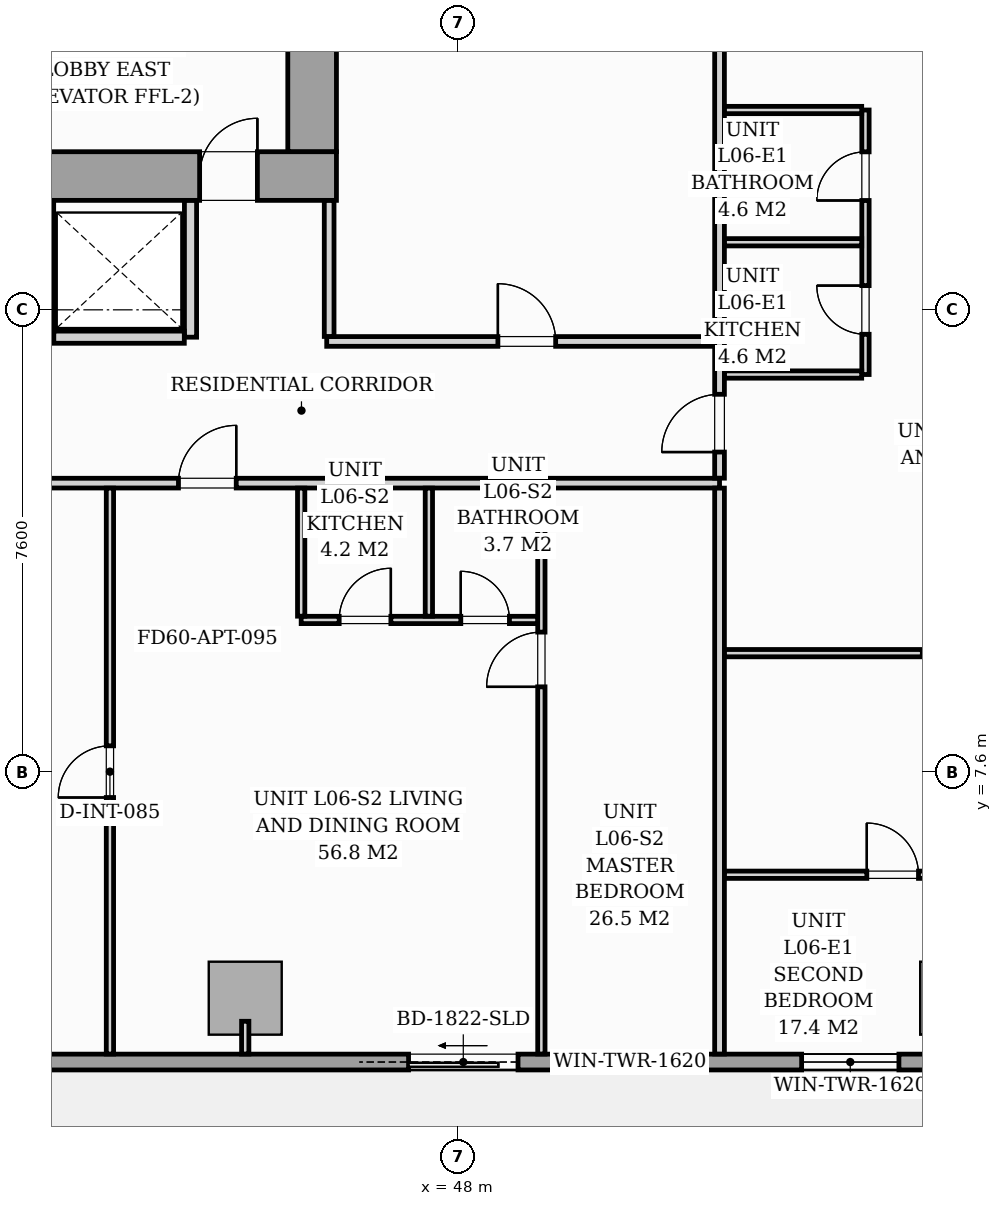
"""IFC4 building model, lengths in metres.
Left out: names, types, materials, properties, quantities, classifications, styles, units other than length and angle.
Written with IfcOpenShell. Run it as: python <this file> out.ifc"""

import sys

from ifc_helpers import new_model, si_unit, direction, frame, frame_2d, origin, origin_2d, place, context, subcontext, project, spatial, rectangle, i_section, extrude, source, transform, mapped, element, fill, save


model = new_model("IFC4")
c1 = context("Model", 3, precision=1e-05, world=origin(), true_north=direction((0.0, 1.0)))
c2 = subcontext(c1, "Body", "Model", "MODEL_VIEW")
j1 = project(units=[si_unit("LENGTHUNIT", "METRE"), si_unit("PLANEANGLEUNIT", "RADIAN")], contexts=[c1])
p1 = place(None, origin())
s1 = spatial("IfcSite", under=j1, at=p1, CompositionType="ELEMENT")
p2 = place(p1, origin())
s2 = spatial("IfcBuilding", under=s1, at=p2, CompositionType="ELEMENT")
p3 = place(p2, frame((0.0, 0.0, 26.2)))
s3 = spatial("IfcBuildingStorey", under=s2, at=p3, CompositionType="ELEMENT", Elevation=26.2)
m1 = source(origin(), c2, "Body", "SweptSolid", [
    extrude(i_section(OverallWidth=0.437, OverallDepth=0.514, WebThickness=0.061, FlangeThickness=0.097, FilletRadius=0.018, at=origin_2d()), origin(), (0.0, 0.0, 1.0), 3.196),
])
p4 = place(p3, frame((45.6, 17.4, 0.002), z_axis=(0.0, 0.0, 1.0), x_axis=(1.0, 0.0, 0.0)))
e1 = element("IfcColumn", 1, at=p4, inside=s3, PredefinedType="PILASTER", context=c2, shape_type="MappedRepresentation", body=[
    mapped(m1, transform((0.0, 0.0, 0.0), scale=1.0)),
])
m2 = source(origin(), c2, "Body", "SweptSolid", [
    extrude(rectangle(XDim=1.2, YDim=1.2, at=origin_2d()), origin(), (0.0, 0.0, 1.0), 3.196),
])
for number, where, z_axis, x_axis in (
    (2, (44.5, 3.88, 0.002), (0.0, 0.0, 1.0), (1.0, 0.0, 0.0)),
    (3, (56.2, 3.88, 0.002), (0.0, 0.0, 1.0), (1.0, 0.0, 0.0)),
):
    element("IfcColumn", number, at=place(p3, frame(where, z_axis=z_axis, x_axis=x_axis)), inside=s3, PredefinedType="COLUMN", context=c2, shape_type="MappedRepresentation", body=[
        mapped(m2, transform((0.0, 0.0, 0.0), scale=1.0)),
    ])
p5 = place(p3, frame((57.3, 2.83, 0.0), z_axis=(0.0, 0.0, 1.0), x_axis=(-1.0, 0.0, 0.0)))
e4 = element("IfcWall", 4, at=p5, inside=s3, PredefinedType="STANDARD", context=c2, shape_type="SweptSolid", body=[
    extrude(rectangle(XDim=17.15, YDim=0.26, at=frame_2d((8.575, 0.0))), origin(), (0.0, 0.0, 1.0), 2.94),
])
p6 = place(p5, frame((8.314, 0.0, 0.0)))
e5 = element("IfcOpeningElement", 5, at=p6, cuts=e4, PredefinedType="OPENING", context=c2, shape_type="SweptSolid", body=[
    extrude(rectangle(XDim=1.8, YDim=2.06, at=frame_2d((0.9, 1.03))), frame((0.0, 0.14, 0.0), z_axis=(0.0, -1.0, 0.0), x_axis=(1.0, 0.0, 0.0)), (0.0, 0.0, 1.0), 0.28),
])
p7 = place(p5, frame((2.05, 0.0, 0.65)))
e6 = element("IfcOpeningElement", 6, at=p7, cuts=e4, PredefinedType="OPENING", context=c2, shape_type="SweptSolid", body=[
    extrude(rectangle(XDim=1.6, YDim=1.5, at=frame_2d((0.8, 0.75))), frame((0.0, 0.14, 0.0), z_axis=(0.0, -1.0, 0.0), x_axis=(1.0, 0.0, 0.0)), (0.0, 0.0, 1.0), 0.28),
])
p8 = place(p5, frame((5.675, 0.0, 0.75)))
e7 = element("IfcOpeningElement", 7, at=p8, cuts=e4, PredefinedType="OPENING", context=c2, shape_type="SweptSolid", body=[
    extrude(rectangle(XDim=1.6, YDim=1.5, at=frame_2d((0.8, 0.75))), frame((0.0, 0.14, 0.0), z_axis=(0.0, -1.0, 0.0), x_axis=(1.0, 0.0, 0.0)), (0.0, 0.0, 1.0), 0.28),
])
p9 = place(p3, frame((26.0, 17.4, 0.0), z_axis=(0.0, 0.0, 1.0), x_axis=(1.0, 0.0, 0.0)))
e8 = element("IfcWall", 8, at=p9, inside=s3, PredefinedType="SHEAR", context=c2, shape_type="SweptSolid", body=[
    extrude(rectangle(XDim=20.0, YDim=0.8, at=frame_2d((10.0, 0.0))), origin(), (0.0, 0.0, 1.0), 3.2),
])
p10 = place(p9, frame((1.15, 0.0, 0.0)))
e9 = element("IfcOpeningElement", 9, at=p10, cuts=e8, PredefinedType="OPENING", context=c2, shape_type="SweptSolid", body=[
    extrude(rectangle(XDim=0.95, YDim=2.06, at=frame_2d((0.475, 1.03))), frame((0.0, 0.41, 0.0), z_axis=(0.0, -1.0, 0.0), x_axis=(1.0, 0.0, 0.0)), (0.0, 0.0, 1.0), 0.82),
])
p11 = place(p9, frame((9.58, 0.0, 0.0)))
e10 = element("IfcOpeningElement", 10, at=p11, cuts=e8, PredefinedType="OPENING", context=c2, shape_type="SweptSolid", body=[
    extrude(rectangle(XDim=0.85, YDim=2.0, at=frame_2d((0.425, 1.0))), frame((0.0, 0.41, 0.0), z_axis=(0.0, -1.0, 0.0), x_axis=(1.0, 0.0, 0.0)), (0.0, 0.0, 1.0), 0.82),
])
p12 = place(p9, frame((17.75, 0.0, 0.0)))
e11 = element("IfcOpeningElement", 11, at=p12, cuts=e8, PredefinedType="OPENING", context=c2, shape_type="SweptSolid", body=[
    extrude(rectangle(XDim=0.95, YDim=2.06, at=frame_2d((0.475, 1.03))), frame((0.0, 0.41, 0.0), z_axis=(0.0, -1.0, 0.0), x_axis=(1.0, 0.0, 0.0)), (0.0, 0.0, 1.0), 0.82),
])
p13 = place(p3, frame((45.6, 17.802, 0.0), z_axis=(0.0, 0.0, 1.0), x_axis=(0.0, 1.0, 0.0)))
e12 = element("IfcWall", 12, at=p13, inside=s3, PredefinedType="SHEAR", context=c2, shape_type="SweptSolid", body=[
    extrude(rectangle(XDim=5.796, YDim=0.8, at=frame_2d((2.898, 0.0))), origin(), (0.0, 0.0, 1.0), 3.2),
])
for number, where, z_axis, x_axis in (
    (13, (41.25, 14.75, 0.0), (0.0, 0.0, 1.0), (0.0, 1.0, 0.0)),
    (14, (43.6, 14.75, 0.0), (0.0, 0.0, 1.0), (0.0, 1.0, 0.0)),
):
    element("IfcWall", number, at=place(p3, frame(where, z_axis=z_axis, x_axis=x_axis)), inside=s3, PredefinedType="PARTITIONING", context=c2, shape_type="SweptSolid", body=[
        extrude(rectangle(XDim=2.248, YDim=0.2, at=frame_2d((1.124, 0.0))), origin(), (0.0, 0.0, 1.0), 2.94),
    ])
p14 = place(p3, frame((41.352, 14.75, 0.0), z_axis=(0.0, 0.0, 1.0), x_axis=(1.0, 0.0, 0.0)))
e15 = element("IfcWall", 15, at=p14, inside=s3, PredefinedType="PARTITIONING", context=c2, shape_type="SweptSolid", body=[
    extrude(rectangle(XDim=2.146, YDim=0.2, at=frame_2d((1.073, 0.0))), origin(), (0.0, 0.0, 1.0), 2.94),
])
p15 = place(p3, frame((15.2, 12.35, 0.0), z_axis=(0.0, 0.0, 1.0), x_axis=(1.0, 0.0, 0.0)))
e16 = element("IfcWall", 16, at=p15, inside=s3, PredefinedType="PARTITIONING", context=c2, shape_type="SweptSolid", body=[
    extrude(rectangle(XDim=37.1, YDim=0.16, at=frame_2d((18.55, 0.0))), origin(), (0.0, 0.0, 1.0), 2.94),
])
p16 = place(p15, frame((2.964, 0.0, 0.0)))
e17 = element("IfcOpeningElement", 17, at=p16, cuts=e16, PredefinedType="OPENING", context=c2, shape_type="SweptSolid", body=[
    extrude(rectangle(XDim=0.95, YDim=2.06, at=frame_2d((0.475, 1.03))), frame((0.0, 0.09, 0.0), z_axis=(0.0, -1.0, 0.0), x_axis=(1.0, 0.0, 0.0)), (0.0, 0.0, 1.0), 0.18),
])
p17 = place(p15, frame((28.202, 0.0, 0.0)))
e18 = element("IfcOpeningElement", 18, at=p17, cuts=e16, PredefinedType="OPENING", context=c2, shape_type="SweptSolid", body=[
    extrude(rectangle(XDim=0.95, YDim=2.06, at=frame_2d((0.475, 1.03))), frame((0.0, 0.09, 0.0), z_axis=(0.0, -1.0, 0.0), x_axis=(1.0, 0.0, 0.0)), (0.0, 0.0, 1.0), 0.18),
])
p18 = place(p3, frame((52.3, 2.962, 0.0), z_axis=(0.0, 0.0, 1.0), x_axis=(0.0, 1.0, 0.0)))
e19 = element("IfcWall", 19, at=p18, inside=s3, PredefinedType="PARTITIONING", context=c2, shape_type="SweptSolid", body=[
    extrude(rectangle(XDim=9.306, YDim=0.16, at=frame_2d((4.653, 0.0))), origin(), (0.0, 0.0, 1.0), 2.94),
])
p19 = place(p3, frame((52.3, 12.432, 0.0), z_axis=(0.0, 0.0, 1.0), x_axis=(0.0, 1.0, 0.0)))
e20 = element("IfcWall", 20, at=p19, inside=s3, PredefinedType="PARTITIONING", context=c2, shape_type="SweptSolid", body=[
    extrude(rectangle(XDim=15.006, YDim=0.16, at=frame_2d((7.503, 0.0))), origin(), (0.0, 0.0, 1.0), 2.94),
])
p20 = place(p19, frame((0.429, 0.0, 0.0)))
e21 = element("IfcOpeningElement", 21, at=p20, cuts=e20, PredefinedType="OPENING", context=c2, shape_type="SweptSolid", body=[
    extrude(rectangle(XDim=0.95, YDim=2.06, at=frame_2d((0.475, 1.03))), frame((0.0, 0.09, 0.0), z_axis=(0.0, -1.0, 0.0), x_axis=(1.0, 0.0, 0.0)), (0.0, 0.0, 1.0), 0.18),
])
p21 = place(p3, frame((49.37, 2.962, 0.0), z_axis=(0.0, 0.0, 1.0), x_axis=(0.0, 1.0, 0.0)))
e22 = element("IfcWall", 22, at=p21, inside=s3, PredefinedType="PARTITIONING", context=c2, shape_type="SweptSolid", body=[
    extrude(rectangle(XDim=9.306, YDim=0.12, at=frame_2d((4.653, 0.0))), origin(), (0.0, 0.0, 1.0), 2.94),
])
p22 = place(p21, frame((6.038, 0.0, 0.0)))
e23 = element("IfcOpeningElement", 23, at=p22, cuts=e22, PredefinedType="OPENING", context=c2, shape_type="SweptSolid", body=[
    extrude(rectangle(XDim=0.9, YDim=2.05, at=frame_2d((0.45, 1.025))), frame((0.0, 0.07, 0.0), z_axis=(0.0, -1.0, 0.0), x_axis=(1.0, 0.0, 0.0)), (0.0, 0.0, 1.0), 0.14),
])
p23 = place(p3, frame((45.42, 10.1, 0.0), z_axis=(0.0, 0.0, 1.0), x_axis=(1.0, 0.0, 0.0)))
e24 = element("IfcWall", 24, at=p23, inside=s3, PredefinedType="PARTITIONING", context=c2, shape_type="SweptSolid", body=[
    extrude(rectangle(XDim=3.888, YDim=0.12, at=frame_2d((1.944, 0.0))), origin(), (0.0, 0.0, 1.0), 2.94),
])
p24 = place(p23, frame((0.625, 0.0, 0.0)))
e25 = element("IfcOpeningElement", 25, at=p24, cuts=e24, PredefinedType="OPENING", context=c2, shape_type="SweptSolid", body=[
    extrude(rectangle(XDim=0.85, YDim=2.05, at=frame_2d((0.425, 1.025))), frame((0.0, 0.07, 0.0), z_axis=(0.0, -1.0, 0.0), x_axis=(1.0, 0.0, 0.0)), (0.0, 0.0, 1.0), 0.14),
])
p25 = place(p23, frame((2.625, 0.0, 0.0)))
e26 = element("IfcOpeningElement", 26, at=p25, cuts=e24, PredefinedType="OPENING", context=c2, shape_type="SweptSolid", body=[
    extrude(rectangle(XDim=0.8, YDim=2.02, at=frame_2d((0.4, 1.01))), frame((0.0, 0.07, 0.0), z_axis=(0.0, -1.0, 0.0), x_axis=(1.0, 0.0, 0.0)), (0.0, 0.0, 1.0), 0.14),
])
for number, where, z_axis, x_axis in (
    (27, (47.52, 10.162, 0.0), (0.0, 0.0, 1.0), (0.0, 1.0, 0.0)),
    (28, (45.42, 10.162, 0.0), (0.0, 0.0, 1.0), (0.0, 1.0, 0.0)),
):
    element("IfcWall", number, at=place(p3, frame(where, z_axis=z_axis, x_axis=x_axis)), inside=s3, PredefinedType="PARTITIONING", context=c2, shape_type="SweptSolid", body=[
        extrude(rectangle(XDim=2.106, YDim=0.12, at=frame_2d((1.053, 0.0))), origin(), (0.0, 0.0, 1.0), 2.94),
    ])
p26 = place(p3, frame((42.275, 2.962, 0.0), z_axis=(0.0, 0.0, 1.0), x_axis=(0.0, 1.0, 0.0)))
e29 = element("IfcWall", 29, at=p26, inside=s3, PredefinedType="PARTITIONING", context=c2, shape_type="SweptSolid", body=[
    extrude(rectangle(XDim=9.306, YDim=0.12, at=frame_2d((4.653, 0.0))), origin(), (0.0, 0.0, 1.0), 2.94),
])
p27 = place(p26, frame((4.218, 0.0, 0.0)))
e30 = element("IfcOpeningElement", 30, at=p27, cuts=e29, PredefinedType="OPENING", context=c2, shape_type="SweptSolid", body=[
    extrude(rectangle(XDim=0.85, YDim=2.05, at=frame_2d((0.425, 1.025))), frame((0.0, 0.07, 0.0), z_axis=(0.0, -1.0, 0.0), x_axis=(1.0, 0.0, 0.0)), (0.0, 0.0, 1.0), 0.14),
])
p28 = place(p3, frame((54.7, 14.136, 0.0), z_axis=(0.0, 0.0, 1.0), x_axis=(0.0, 1.0, 0.0)))
e31 = element("IfcWall", 31, at=p28, inside=s3, PredefinedType="PARTITIONING", context=c2, shape_type="SweptSolid", body=[
    extrude(rectangle(XDim=4.35, YDim=0.12, at=frame_2d((2.175, 0.0))), origin(), (0.0, 0.0, 1.0), 2.94),
])
p29 = place(p28, frame((0.662, 0.0, 0.0)))
e32 = element("IfcOpeningElement", 32, at=p29, cuts=e31, PredefinedType="OPENING", context=c2, shape_type="SweptSolid", body=[
    extrude(rectangle(XDim=0.8, YDim=2.0, at=frame_2d((0.4, 1.0))), frame((0.0, 0.07, 0.0), z_axis=(0.0, -1.0, 0.0), x_axis=(1.0, 0.0, 0.0)), (0.0, 0.0, 1.0), 0.14),
])
p30 = place(p28, frame((2.862, 0.0, 0.0)))
e33 = element("IfcOpeningElement", 33, at=p30, cuts=e31, PredefinedType="OPENING", context=c2, shape_type="SweptSolid", body=[
    extrude(rectangle(XDim=0.8, YDim=2.02, at=frame_2d((0.4, 1.01))), frame((0.0, 0.07, 0.0), z_axis=(0.0, -1.0, 0.0), x_axis=(1.0, 0.0, 0.0)), (0.0, 0.0, 1.0), 0.14),
])
p31 = place(p3, frame((52.382, 16.311, 0.0), z_axis=(0.0, 0.0, 1.0), x_axis=(1.0, 0.0, 0.0)))
e34 = element("IfcWall", 34, at=p31, inside=s3, PredefinedType="PARTITIONING", context=c2, shape_type="SweptSolid", body=[
    extrude(rectangle(XDim=2.256, YDim=0.12, at=frame_2d((1.128, 0.0))), origin(), (0.0, 0.0, 1.0), 2.045),
])
for number, where, z_axis, x_axis in (
    (35, (52.382, 14.136, 0.0), (0.0, 0.0, 1.0), (1.0, 0.0, 0.0)),
    (36, (52.382, 18.486, 0.0), (0.0, 0.0, 1.0), (1.0, 0.0, 0.0)),
):
    element("IfcWall", number, at=place(p3, frame(where, z_axis=z_axis, x_axis=x_axis)), inside=s3, PredefinedType="PARTITIONING", context=c2, shape_type="SweptSolid", body=[
        extrude(rectangle(XDim=2.256, YDim=0.12, at=frame_2d((1.128, 0.0))), origin(), (0.0, 0.0, 1.0), 2.94),
    ])
p32 = place(p3, frame((52.382, 5.91, 0.0), z_axis=(0.0, 0.0, 1.0), x_axis=(1.0, 0.0, 0.0)))
e37 = element("IfcWall", 37, at=p32, inside=s3, PredefinedType="PARTITIONING", context=c2, shape_type="SweptSolid", body=[
    extrude(rectangle(XDim=7.338, YDim=0.12, at=frame_2d((3.669, 0.0))), origin(), (0.0, 0.0, 1.0), 2.94),
])
p33 = place(p32, frame((2.34, 0.0, 0.0)))
e38 = element("IfcOpeningElement", 38, at=p33, cuts=e37, PredefinedType="OPENING", context=c2, shape_type="SweptSolid", body=[
    extrude(rectangle(XDim=0.85, YDim=2.05, at=frame_2d((0.425, 1.025))), frame((0.0, 0.07, 0.0), z_axis=(0.0, -1.0, 0.0), x_axis=(1.0, 0.0, 0.0)), (0.0, 0.0, 1.0), 0.14),
])
p34 = place(p3, frame((52.382, 9.554, 0.0), z_axis=(0.0, 0.0, 1.0), x_axis=(1.0, 0.0, 0.0)))
e39 = element("IfcWall", 39, at=p34, inside=s3, PredefinedType="PARTITIONING", context=c2, shape_type="SweptSolid", body=[
    extrude(rectangle(XDim=7.338, YDim=0.12, at=frame_2d((3.669, 0.0))), origin(), (0.0, 0.0, 1.0), 2.94),
])
p35 = place(p34, frame((3.253, 0.0, 0.0)))
e40 = element("IfcOpeningElement", 40, at=p35, cuts=e39, PredefinedType="OPENING", context=c2, shape_type="SweptSolid", body=[
    extrude(rectangle(XDim=0.85, YDim=2.05, at=frame_2d((0.425, 1.025))), frame((0.0, 0.07, 0.0), z_axis=(0.0, -1.0, 0.0), x_axis=(1.0, 0.0, 0.0)), (0.0, 0.0, 1.0), 0.14),
])
p36 = place(p3, frame((45.84, 14.68, 0.0), z_axis=(0.0, 0.0, 1.0), x_axis=(1.0, 0.0, 0.0)))
e41 = element("IfcWall", 41, at=p36, inside=s3, PredefinedType="PARTITIONING", context=c2, shape_type="SweptSolid", body=[
    extrude(rectangle(XDim=6.378, YDim=0.16, at=frame_2d((3.189, 0.0))), origin(), (0.0, 0.0, 1.0), 2.94),
])
p37 = place(p36, frame((2.815, 0.0, 0.0)))
e42 = element("IfcOpeningElement", 42, at=p37, cuts=e41, PredefinedType="OPENING", context=c2, shape_type="SweptSolid", body=[
    extrude(rectangle(XDim=0.95, YDim=2.06, at=frame_2d((0.475, 1.03))), frame((0.0, 0.09, 0.0), z_axis=(0.0, -1.0, 0.0), x_axis=(1.0, 0.0, 0.0)), (0.0, 0.0, 1.0), 0.18),
])
p38 = place(p3, frame((45.88, 14.762, 0.0), z_axis=(0.0, 0.0, 1.0), x_axis=(0.0, 1.0, 0.0)))
e43 = element("IfcWall", 43, at=p38, inside=s3, PredefinedType="PARTITIONING", context=c2, shape_type="SweptSolid", body=[
    extrude(rectangle(XDim=2.236, YDim=0.16, at=frame_2d((1.118, 0.0))), origin(), (0.0, 0.0, 1.0), 2.94),
])
p39 = place(p3, frame((44.5, 3.5, 0.0), z_axis=(0.0, 0.0, 1.0), x_axis=(0.0, -1.0, 0.0)))
e44 = element("IfcWall", 44, at=p39, inside=s3, PredefinedType="PARTITIONING", context=c2, shape_type="SweptSolid", body=[
    extrude(rectangle(XDim=0.538, YDim=0.12, at=frame_2d((0.269, 0.0))), origin(), (0.0, 0.0, 1.0), 2.94),
])
m3 = source(origin(), c2, "Body", "SweptSolid", [
    extrude(rectangle(XDim=1.8, YDim=2.06, at=frame_2d((0.9, 1.03))), frame((0.0, 0.025, 0.0), z_axis=(0.0, -1.0, 0.0), x_axis=(1.0, 0.0, 0.0)), (0.0, 0.0, 1.0), 0.05),
])
p40 = place(p6, origin())
e45 = element("IfcDoor", 45, at=p40, inside=s3, OperationType="SLIDING_TO_RIGHT", PredefinedType="DOOR", context=c2, shape_type="MappedRepresentation", body=[
    mapped(m3, transform((0.0, 0.0, 0.0), scale=1.0)),
])
fill(e5, e45)
m4 = source(origin(), c2, "Body", "SweptSolid", [
    extrude(rectangle(XDim=1.6, YDim=1.5, at=frame_2d((0.8, 0.75))), frame((0.0, 0.03, 0.0), z_axis=(0.0, -1.0, 0.0), x_axis=(1.0, 0.0, 0.0)), (0.0, 0.0, 1.0), 0.06),
])
p41 = place(p7, origin())
e46 = element("IfcWindow", 46, at=p41, inside=s3, PartitioningType="SINGLE_PANEL", PredefinedType="WINDOW", context=c2, shape_type="MappedRepresentation", body=[
    mapped(m4, transform((0.0, 0.0, 0.0), scale=1.0)),
])
fill(e6, e46)
p42 = place(p8, origin())
e47 = element("IfcWindow", 47, at=p42, inside=s3, PartitioningType="SINGLE_PANEL", PredefinedType="WINDOW", context=c2, shape_type="MappedRepresentation", body=[
    mapped(m4, transform((0.0, 0.0, 0.0), scale=1.0)),
])
fill(e7, e47)
m5 = source(origin(), c2, "Body", "SweptSolid", [
    extrude(rectangle(XDim=0.95, YDim=2.06, at=frame_2d((0.475, 1.03))), frame((0.0, 0.025, 0.0), z_axis=(0.0, -1.0, 0.0), x_axis=(1.0, 0.0, 0.0)), (0.0, 0.0, 1.0), 0.05),
])
p43 = place(p12, origin())
e48 = element("IfcDoor", 48, at=p43, inside=s3, OperationType="SINGLE_SWING_RIGHT", PredefinedType="DOOR", context=c2, shape_type="MappedRepresentation", body=[
    mapped(m5, transform((0.0, 0.0, 0.0), scale=1.0)),
])
fill(e11, e48)
m6 = source(origin(), c2, "Body", "SweptSolid", [
    extrude(rectangle(XDim=0.85, YDim=2.05, at=frame_2d((0.425, 1.025))), frame((0.0, 0.025, 0.0), z_axis=(0.0, -1.0, 0.0), x_axis=(1.0, 0.0, 0.0)), (0.0, 0.0, 1.0), 0.05),
])
p44 = place(p27, origin())
e49 = element("IfcDoor", 49, at=p44, inside=s3, OperationType="SINGLE_SWING_LEFT", PredefinedType="DOOR", context=c2, shape_type="MappedRepresentation", body=[
    mapped(m6, transform((0.0, 0.0, 0.0), scale=1.0)),
])
fill(e30, e49)
m7 = source(origin(), c2, "Body", "SweptSolid", [
    extrude(rectangle(XDim=0.95, YDim=2.06, at=frame_2d((0.475, 1.03))), frame((0.0, 0.025, 0.0), z_axis=(0.0, -1.0, 0.0), x_axis=(1.0, 0.0, 0.0)), (0.0, 0.0, 1.0), 0.05),
])
p45 = place(p17, origin())
e50 = element("IfcDoor", 50, at=p45, inside=s3, OperationType="SINGLE_SWING_RIGHT", PredefinedType="DOOR", context=c2, shape_type="MappedRepresentation", body=[
    mapped(m7, transform((0.0, 0.0, 0.0), scale=1.0)),
])
fill(e18, e50)
m8 = source(origin(), c2, "Body", "SweptSolid", [
    extrude(rectangle(XDim=0.9, YDim=2.05, at=frame_2d((0.45, 1.025))), frame((0.0, 0.025, 0.0), z_axis=(0.0, -1.0, 0.0), x_axis=(1.0, 0.0, 0.0)), (0.0, 0.0, 1.0), 0.05),
])
p46 = place(p22, origin())
e51 = element("IfcDoor", 51, at=p46, inside=s3, OperationType="SINGLE_SWING_LEFT", PredefinedType="DOOR", context=c2, shape_type="MappedRepresentation", body=[
    mapped(m8, transform((0.0, 0.0, 0.0), scale=1.0)),
])
fill(e23, e51)
p47 = place(p24, origin())
e52 = element("IfcDoor", 52, at=p47, inside=s3, OperationType="SINGLE_SWING_RIGHT", PredefinedType="DOOR", context=c2, shape_type="MappedRepresentation", body=[
    mapped(m6, transform((0.0, 0.0, 0.0), scale=1.0)),
])
fill(e25, e52)
m9 = source(origin(), c2, "Body", "SweptSolid", [
    extrude(rectangle(XDim=0.8, YDim=2.02, at=frame_2d((0.4, 1.01))), frame((0.0, 0.025, 0.0), z_axis=(0.0, -1.0, 0.0), x_axis=(1.0, 0.0, 0.0)), (0.0, 0.0, 1.0), 0.05),
])
p48 = place(p25, origin())
e53 = element("IfcDoor", 53, at=p48, inside=s3, OperationType="SINGLE_SWING_LEFT", PredefinedType="DOOR", context=c2, shape_type="MappedRepresentation", body=[
    mapped(m9, transform((0.0, 0.0, 0.0), scale=1.0)),
])
fill(e26, e53)
p49 = place(p20, origin())
e54 = element("IfcDoor", 54, at=p49, inside=s3, OperationType="SINGLE_SWING_LEFT", PredefinedType="DOOR", context=c2, shape_type="MappedRepresentation", body=[
    mapped(m7, transform((0.0, 0.0, 0.0), scale=1.0)),
])
fill(e21, e54)
m10 = source(origin(), c2, "Body", "SweptSolid", [
    extrude(rectangle(XDim=0.8, YDim=2.0, at=frame_2d((0.4, 1.0))), frame((0.0, 0.025, 0.0), z_axis=(0.0, -1.0, 0.0), x_axis=(1.0, 0.0, 0.0)), (0.0, 0.0, 1.0), 0.05),
])
p50 = place(p29, origin())
e55 = element("IfcDoor", 55, at=p50, inside=s3, OperationType="SINGLE_SWING_RIGHT", PredefinedType="DOOR", context=c2, shape_type="MappedRepresentation", body=[
    mapped(m10, transform((0.0, 0.0, 0.0), scale=1.0)),
])
fill(e32, e55)
p51 = place(p30, origin())
e56 = element("IfcDoor", 56, at=p51, inside=s3, OperationType="SINGLE_SWING_LEFT", PredefinedType="DOOR", context=c2, shape_type="MappedRepresentation", body=[
    mapped(m9, transform((0.0, 0.0, 0.0), scale=1.0)),
])
fill(e33, e56)
p52 = place(p33, origin())
e57 = element("IfcDoor", 57, at=p52, inside=s3, OperationType="SINGLE_SWING_LEFT", PredefinedType="DOOR", context=c2, shape_type="MappedRepresentation", body=[
    mapped(m6, transform((0.0, 0.0, 0.0), scale=1.0)),
])
fill(e38, e57)
p53 = place(p35, origin())
e58 = element("IfcDoor", 58, at=p53, inside=s3, OperationType="SINGLE_SWING_RIGHT", PredefinedType="DOOR", context=c2, shape_type="MappedRepresentation", body=[
    mapped(m6, transform((0.0, 0.0, 0.0), scale=1.0)),
])
fill(e40, e58)
p54 = place(p37, origin())
e59 = element("IfcDoor", 59, at=p54, inside=s3, OperationType="SINGLE_SWING_LEFT", PredefinedType="DOOR", context=c2, shape_type="MappedRepresentation", body=[
    mapped(m7, transform((0.0, 0.0, 0.0), scale=1.0)),
])
fill(e42, e59)
save(model, sys.argv[1])
